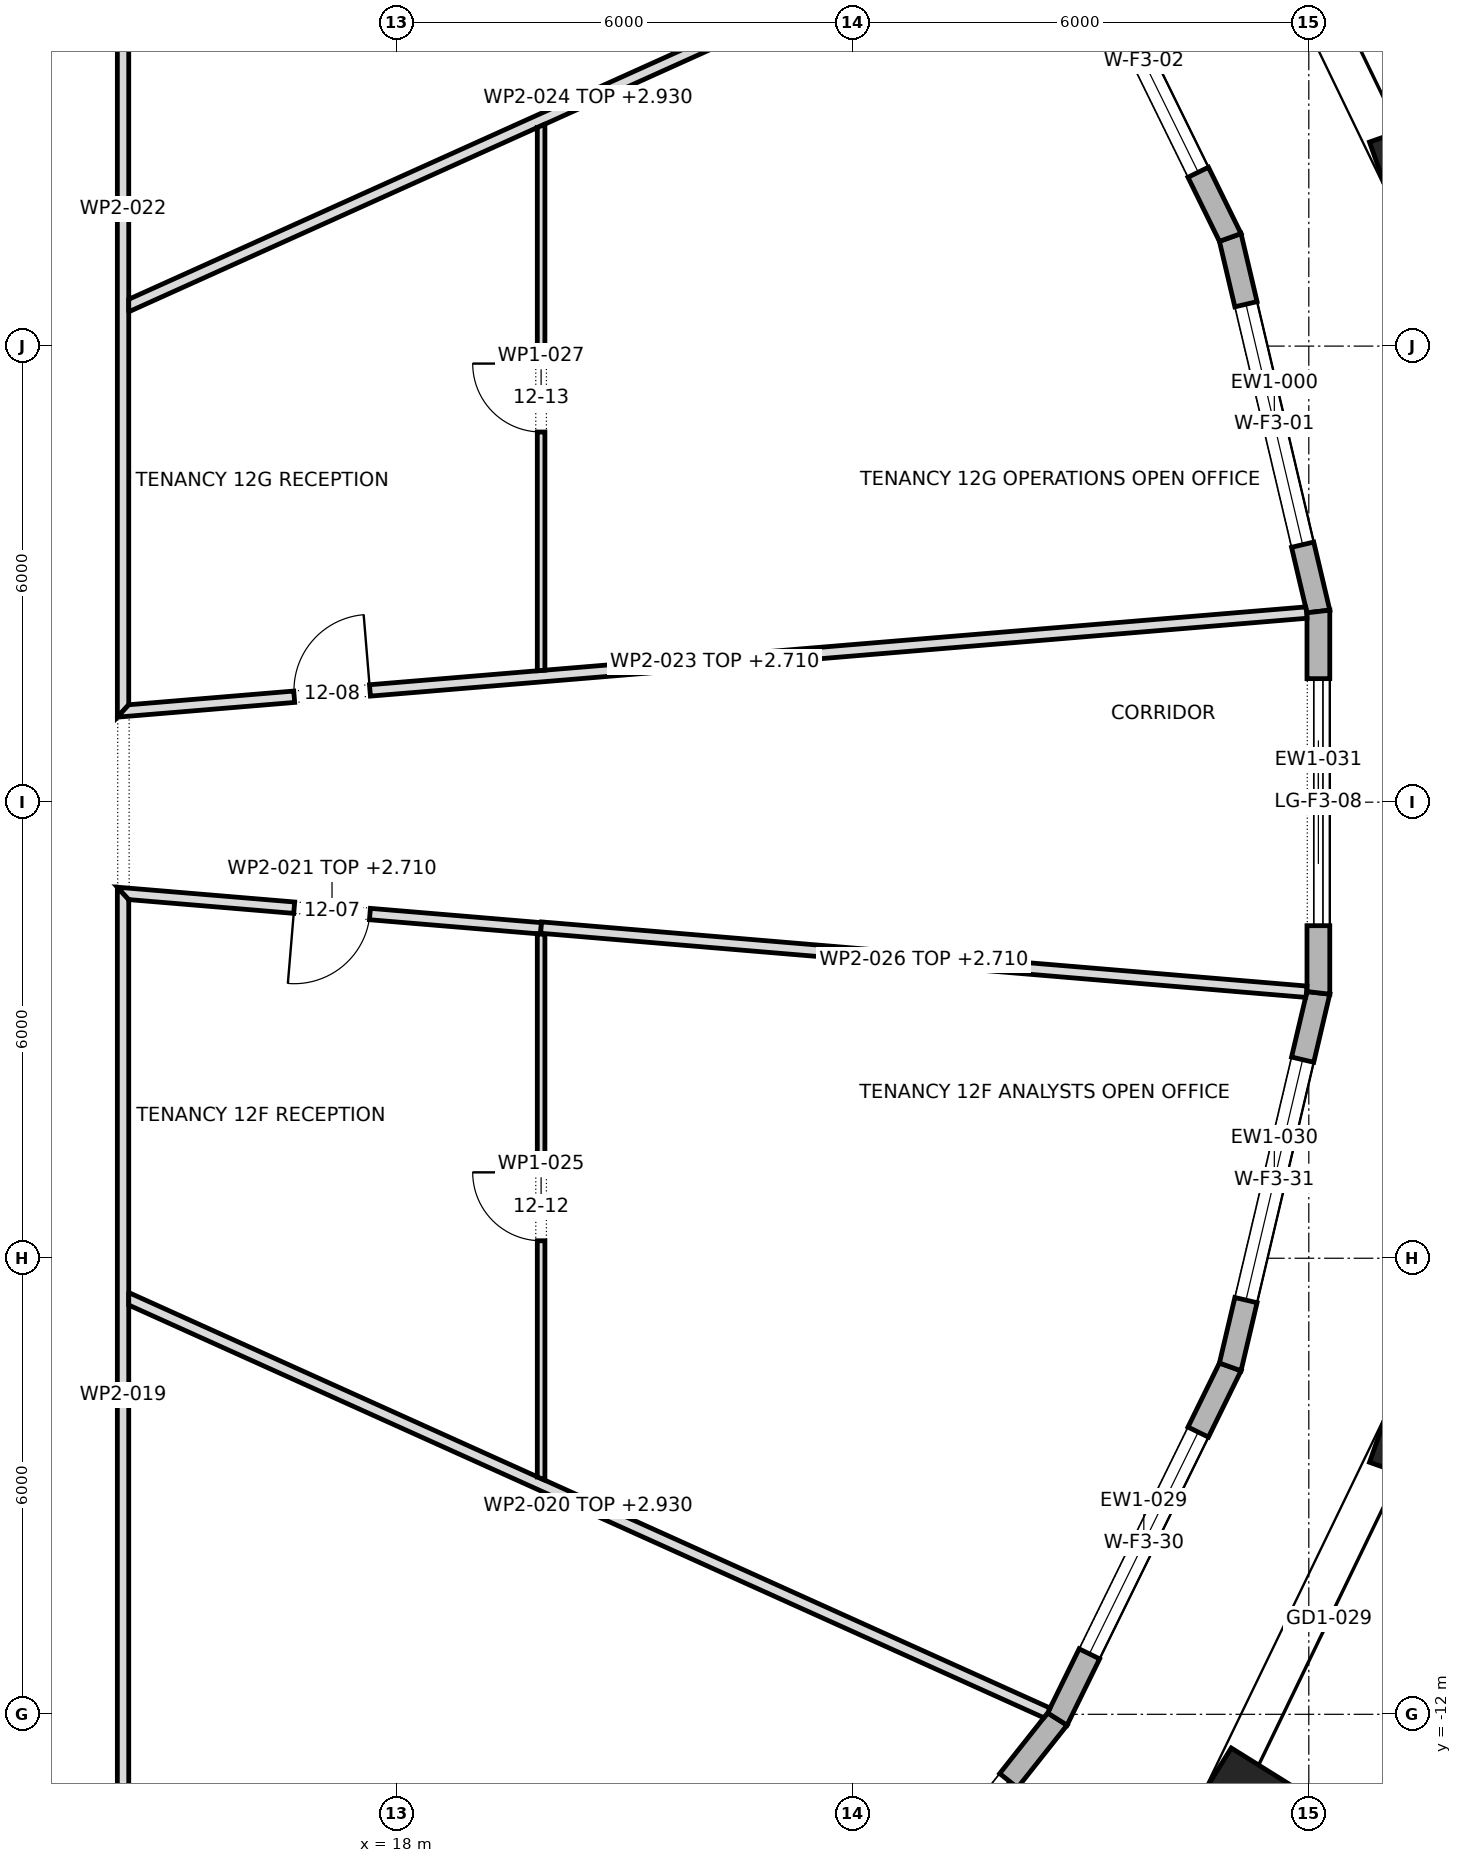
"""IFC4 building model, lengths in metres.
Left out: names, types, materials, properties, quantities, classifications, styles, units other than length and angle.
Written with IfcOpenShell. Run it as: python <this file> out.ifc"""

import sys

from ifc_helpers import new_model, si_unit, direction, frame, frame_2d, origin, origin_2d, place, context, subcontext, project, spatial, polyline, rectangle, outline, extrude, element, fill, save


model = new_model("IFC4")
c1 = context("Model", 3, precision=1e-05, world=origin(), true_north=direction((0.0, 1.0)))
c2 = subcontext(c1, "Body", "Model", "MODEL_VIEW")
j1 = project(units=[si_unit("LENGTHUNIT", "METRE"), si_unit("PLANEANGLEUNIT", "RADIAN")], contexts=[c1])
p1 = place(None, origin())
s1 = spatial("IfcSite", under=j1, at=p1, CompositionType="ELEMENT")
p2 = place(p1, origin())
s2 = spatial("IfcBuilding", under=s1, at=p2, CompositionType="ELEMENT")
p3 = place(p2, frame((0.0, 0.0, 178.9)))
s3 = spatial("IfcBuildingStorey", under=s2, at=p3, CompositionType="ELEMENT", Elevation=178.9)
for number, where, z_axis, x_axis in (
    (1, (31.503, 8.191, 0.0), (0.0, 0.0, 1.0), (-0.334, 0.943, 0.0)),
    (2, (29.034, -13.302, 0.0), (0.0, 0.0, 1.0), (0.529, 0.849, 0.0)),
    (3, (31.503, -8.191, 0.0), (0.0, 0.0, 1.0), (0.334, 0.943, 0.0)),
):
    element("IfcColumn", number, at=place(p3, frame(where, z_axis=z_axis, x_axis=x_axis)), inside=s3, PredefinedType="COLUMN", context=c2, shape_type="SweptSolid", body=[
        extrude(rectangle(XDim=1.4, YDim=1.0, at=origin_2d()), origin(), (0.0, 0.0, 1.0), 4.0),
    ])
p4 = place(p3, frame((30.126, 2.509, 0.0), z_axis=(0.0, 0.0, 1.0), x_axis=(-0.229434992017, 0.973323987395, 0.0)))
e4 = element("IfcWall", 4, at=p4, inside=s3, PredefinedType="STANDARD", context=c2, shape_type="SweptSolid", body=[
    extrude(outline(polyline([(-0.017, -0.15), (5.072, -0.15), (5.039, 0.15), (0.017, 0.15), (-0.017, -0.15)])), origin(), (0.0, 0.0, 1.0), 3.7),
])
p5 = place(p4, frame((0.903, 0.0, 0.6)))
e5 = element("IfcOpeningElement", 5, at=p5, cuts=e4, PredefinedType="OPENING", context=c2, shape_type="SweptSolid", body=[
    extrude(rectangle(XDim=3.25, YDim=2.65, at=frame_2d((1.625, 1.325))), frame((0.0, 0.162, 0.0), z_axis=(0.0, -1.0, 0.0), x_axis=(1.0, 0.0, 0.0)), (0.0, 0.0, 1.0), 0.324),
])
p6 = place(p3, frame((28.966, 7.429, 0.0), z_axis=(0.0, 0.0, 1.0), x_axis=(-0.440673883676, 0.897667270343, 0.0)))
e6 = element("IfcWall", 6, at=p6, inside=s3, PredefinedType="STANDARD", context=c2, shape_type="SweptSolid", body=[
    extrude(outline(polyline([(-0.017, -0.15), (5.177, -0.15), (5.145, 0.15), (0.017, 0.15), (-0.017, -0.15)])), origin(), (0.0, 0.0, 1.0), 3.7),
])
p7 = place(p6, frame((0.956, 0.0, 0.6)))
e7 = element("IfcOpeningElement", 7, at=p7, cuts=e6, PredefinedType="OPENING", context=c2, shape_type="SweptSolid", body=[
    extrude(rectangle(XDim=3.25, YDim=2.65, at=frame_2d((1.625, 1.325))), frame((0.0, 0.162, 0.0), z_axis=(0.0, -1.0, 0.0), x_axis=(1.0, 0.0, 0.0)), (0.0, 0.0, 1.0), 0.324),
])
p8 = place(p3, frame((23.392, -16.23, 0.0), z_axis=(0.0, 0.0, 1.0), x_axis=(0.620766467446, 0.78399553117, 0.0)))
e8 = element("IfcWall", 8, at=p8, inside=s3, PredefinedType="STANDARD", context=c2, shape_type="SweptSolid", body=[
    extrude(outline(polyline([(-0.015, -0.15), (5.332, -0.15), (5.3, 0.15), (0.015, 0.15), (-0.015, -0.15)])), origin(), (0.0, 0.0, 1.0), 3.7),
])
p9 = place(p8, frame((1.033, 0.0, 0.6)))
e9 = element("IfcOpeningElement", 9, at=p9, cuts=e8, PredefinedType="OPENING", context=c2, shape_type="SweptSolid", body=[
    extrude(rectangle(XDim=3.25, YDim=2.65, at=frame_2d((1.625, 1.325))), frame((0.0, 0.162, 0.0), z_axis=(0.0, -1.0, 0.0), x_axis=(1.0, 0.0, 0.0)), (0.0, 0.0, 1.0), 0.324),
])
p10 = place(p3, frame((26.692, -12.062, 0.0), z_axis=(0.0, 0.0, 1.0), x_axis=(0.440673883676, 0.897667270343, 0.0)))
e10 = element("IfcWall", 10, at=p10, inside=s3, PredefinedType="STANDARD", context=c2, shape_type="SweptSolid", body=[
    extrude(outline(polyline([(-0.016, -0.15), (5.178, -0.15), (5.144, 0.15), (0.016, 0.15), (-0.016, -0.15)])), origin(), (0.0, 0.0, 1.0), 3.7),
])
p11 = place(p10, frame((0.956, 0.0, 0.6)))
e11 = element("IfcOpeningElement", 11, at=p11, cuts=e10, PredefinedType="OPENING", context=c2, shape_type="SweptSolid", body=[
    extrude(rectangle(XDim=3.25, YDim=2.65, at=frame_2d((1.625, 1.325))), frame((0.0, 0.162, 0.0), z_axis=(0.0, -1.0, 0.0), x_axis=(1.0, 0.0, 0.0)), (0.0, 0.0, 1.0), 0.324),
])
p12 = place(p3, frame((28.966, -7.429, 0.0), z_axis=(0.0, 0.0, 1.0), x_axis=(0.229434992017, 0.973323987395, 0.0)))
e12 = element("IfcWall", 12, at=p12, inside=s3, PredefinedType="STANDARD", context=c2, shape_type="SweptSolid", body=[
    extrude(outline(polyline([(-0.017, -0.15), (5.073, -0.15), (5.038, 0.15), (0.017, 0.15), (-0.017, -0.15)])), origin(), (0.0, 0.0, 1.0), 3.7),
])
p13 = place(p12, frame((0.903, 0.0, 0.6)))
e13 = element("IfcOpeningElement", 13, at=p13, cuts=e12, PredefinedType="OPENING", context=c2, shape_type="SweptSolid", body=[
    extrude(rectangle(XDim=3.25, YDim=2.65, at=frame_2d((1.625, 1.325))), frame((0.0, 0.162, 0.0), z_axis=(0.0, -1.0, 0.0), x_axis=(1.0, 0.0, 0.0)), (0.0, 0.0, 1.0), 0.324),
])
p14 = place(p3, frame((30.126, -2.509, 0.0), z_axis=(0.0, 0.0, 1.0), x_axis=(0.0, 1.0, 0.0)))
e14 = element("IfcWall", 14, at=p14, inside=s3, PredefinedType="STANDARD", context=c2, shape_type="SweptSolid", body=[
    extrude(outline(polyline([(-0.017, -0.15), (5.035, -0.15), (5.0, 0.15), (0.017, 0.15), (-0.017, -0.15)])), origin(), (0.0, 0.0, 1.0), 3.7),
])
p15 = place(p14, frame((0.884, 0.0, 0.0)))
e15 = element("IfcOpeningElement", 15, at=p15, cuts=e14, PredefinedType="OPENING", context=c2, shape_type="SweptSolid", body=[
    extrude(rectangle(XDim=3.25, YDim=3.25, at=frame_2d((1.625, 1.625))), frame((0.0, 0.162, 0.0), z_axis=(0.0, -1.0, 0.0), x_axis=(1.0, 0.0, 0.0)), (0.0, 0.0, 1.0), 0.324),
])
p16 = place(p3, frame((14.4, -14.475, 0.0), z_axis=(0.0, 0.0, 1.0), x_axis=(0.0, 1.0, 0.0)))
e16 = element("IfcWall", 16, at=p16, inside=s3, PredefinedType="PARTITIONING", context=c2, shape_type="SweptSolid", body=[
    extrude(outline(polyline([(0.0, -0.075), (1.885, -0.075), (3.77, -0.075), (5.655, -0.075), (7.539, -0.075), (9.424, -0.075), (11.309, -0.075), (13.194, -0.075), (13.357, 0.075), (11.47, 0.075), (9.583, 0.075), (7.697, 0.075), (5.81, 0.075), (3.923, 0.075), (2.037, 0.075), (0.15, 0.075), (0.0, -0.075)])), origin(), (0.0, 0.0, 1.0), 3.7),
])
p17 = place(p3, frame((14.444, -6.52, 0.0), z_axis=(0.0, 0.0, 1.0), x_axis=(0.911592423636, -0.411095187479, 0.0)))
e17 = element("IfcWall", 17, at=p17, inside=s3, PredefinedType="PARTITIONING", context=c2, shape_type="SweptSolid", body=[
    extrude(outline(polyline([(0.068, -0.075), (1.954, -0.075), (3.841, -0.075), (5.728, -0.075), (7.615, -0.075), (9.501, -0.075), (11.388, -0.075), (13.274, -0.075), (13.294, 0.003), (13.296, 0.072), (13.296, 0.075), (11.448, 0.075), (9.599, 0.075), (7.75, 0.075), (5.901, 0.075), (5.897, 0.073), (5.896, 0.075), (3.931, 0.075), (1.966, 0.075), (0.0, 0.075), (0.068, -0.075)])), origin(), (0.0, 0.0, 1.0), 2.93),
])
p18 = place(p3, frame((14.319, -1.193, 0.0), z_axis=(0.0, 0.0, 1.0), x_axis=(0.996519550004, -0.083359381354, 0.0)))
e18 = element("IfcWall", 18, at=p18, inside=s3, PredefinedType="PARTITIONING", context=c2, shape_type="SweptSolid", body=[
    extrude(outline(polyline([(0.163, -0.075), (1.973, -0.075), (3.783, -0.075), (5.593, -0.075), (5.6, -0.074), (5.6, 0.075), (3.733, 0.075), (1.867, 0.075), (0.0, 0.075), (0.082, 0.0), (0.163, -0.075)])), origin(), (0.0, 0.0, 1.0), 2.71),
])
p19 = place(p18, frame((2.341, 0.0, 0.0)))
e19 = element("IfcOpeningElement", 19, at=p19, cuts=e18, PredefinedType="OPENING", context=c2, shape_type="SweptSolid", body=[
    extrude(rectangle(XDim=1.0, YDim=2.1, at=frame_2d((0.5, 1.05))), frame((0.0, 0.087, 0.0), z_axis=(0.0, -1.0, 0.0), x_axis=(1.0, 0.0, 0.0)), (0.0, 0.0, 1.0), 0.174),
])
p20 = place(p3, frame((14.4, 1.118, 0.0), z_axis=(0.0, 0.0, 1.0), x_axis=(0.0, 1.0, 0.0)))
e20 = element("IfcWall", 20, at=p20, inside=s3, PredefinedType="PARTITIONING", context=c2, shape_type="SweptSolid", body=[
    extrude(outline(polyline([(0.163, -0.075), (2.048, -0.075), (3.933, -0.075), (5.817, -0.075), (7.702, -0.075), (9.587, -0.075), (11.472, -0.075), (13.356, -0.075), (13.207, 0.075), (11.32, 0.075), (9.433, 0.075), (7.547, 0.075), (5.66, 0.075), (3.773, 0.075), (1.887, 0.075), (0.0, 0.075), (0.163, -0.075)])), origin(), (0.0, 0.0, 1.0), 3.7),
])
p21 = place(p20, frame((8.832, 0.0, 0.0)))
e21 = element("IfcOpeningElement", 21, at=p21, cuts=e20, PredefinedType="OPENING", context=c2, shape_type="SweptSolid", body=[
    extrude(rectangle(XDim=1.0, YDim=2.1, at=frame_2d((0.5, 1.05))), frame((0.0, 0.087, 0.0), z_axis=(0.0, -1.0, 0.0), x_axis=(1.0, 0.0, 0.0)), (0.0, 0.0, 1.0), 0.174),
])
p22 = place(p3, frame((14.319, 1.193, 0.0), z_axis=(0.0, 0.0, 1.0), x_axis=(0.996561500002, 0.082856361942, 0.0)))
e22 = element("IfcWall", 22, at=p22, inside=s3, PredefinedType="PARTITIONING", context=c2, shape_type="SweptSolid", body=[
    extrude(outline(polyline([(0.0, -0.075), (1.963, -0.075), (3.926, -0.075), (5.889, -0.075), (7.853, -0.075), (9.816, -0.075), (11.779, -0.075), (13.742, -0.075), (15.705, -0.075), (15.705, -0.074), (15.705, 0.036), (15.699, 0.075), (13.757, 0.075), (11.815, 0.075), (9.873, 0.075), (7.931, 0.075), (5.989, 0.075), (4.047, 0.075), (2.105, 0.075), (0.163, 0.075), (0.082, 0.0), (0.0, -0.075), (0.0, -0.075)])), origin(), (0.0, 0.0, 1.0), 2.71),
])
p23 = place(p22, frame((2.341, 0.0, 0.0)))
e23 = element("IfcOpeningElement", 23, at=p23, cuts=e22, PredefinedType="OPENING", context=c2, shape_type="SweptSolid", body=[
    extrude(rectangle(XDim=1.0, YDim=2.1, at=frame_2d((0.5, 1.05))), frame((0.0, 0.087, 0.0), z_axis=(0.0, -1.0, 0.0), x_axis=(1.0, 0.0, 0.0)), (0.0, 0.0, 1.0), 0.174),
])
p24 = place(p3, frame((14.445, 6.52, 0.0), z_axis=(0.0, 0.0, 1.0), x_axis=(0.911609963385, 0.411056291349, 0.0)))
e24 = element("IfcWall", 24, at=p24, inside=s3, PredefinedType="PARTITIONING", context=c2, shape_type="SweptSolid", body=[
    extrude(outline(polyline([(0.0, -0.075), (1.965, -0.075), (3.93, -0.075), (5.896, -0.075), (5.897, -0.073), (5.901, -0.075), (7.75, -0.075), (9.599, -0.075), (11.447, -0.075), (13.296, -0.075), (13.296, -0.069), (13.294, -0.003), (13.274, 0.075), (11.387, 0.075), (9.501, 0.075), (7.614, 0.075), (5.727, 0.075), (3.841, 0.075), (1.954, 0.075), (0.067, 0.075), (0.0, -0.074), (0.0, -0.075)])), origin(), (0.0, 0.0, 1.0), 2.93),
])
p25 = place(p3, frame((19.9, -1.729, 0.0), z_axis=(0.0, 0.0, 1.0), x_axis=(0.0, -1.0, 0.0)))
e25 = element("IfcWall", 25, at=p25, inside=s3, PredefinedType="PARTITIONING", context=c2, shape_type="SweptSolid", body=[
    extrude(outline(polyline([(0.002, -0.05), (1.788, -0.05), (3.574, -0.05), (5.36, -0.05), (7.146, -0.05), (7.191, 0.05), (7.191, 0.05), (5.393, 0.05), (3.595, 0.05), (1.798, 0.05), (0.0, 0.05), (0.0, -0.007), (0.005, -0.007), (0.002, -0.05)])), origin(), (0.0, 0.0, 1.0), 3.7),
])
p26 = place(p25, frame((3.14, 0.0, 0.0)))
e26 = element("IfcOpeningElement", 26, at=p26, cuts=e25, PredefinedType="OPENING", context=c2, shape_type="SweptSolid", body=[
    extrude(rectangle(XDim=0.9, YDim=2.1, at=frame_2d((0.45, 1.05))), frame((0.0, 0.062, 0.0), z_axis=(0.0, -1.0, 0.0), x_axis=(1.0, 0.0, 0.0)), (0.0, 0.0, 1.0), 0.124),
])
p27 = place(p3, frame((19.9, -1.65, 0.0), z_axis=(0.0, 0.0, 1.0), x_axis=(0.996505820255, -0.083523351209, 0.0)))
e27 = element("IfcWall", 27, at=p27, inside=s3, PredefinedType="PARTITIONING", context=c2, shape_type="SweptSolid", body=[
    extrude(outline(polyline([(0.0, -0.075), (1.683, -0.075), (3.366, -0.075), (5.05, -0.075), (6.733, -0.075), (8.417, -0.075), (10.1, -0.075), (10.105, -0.039), (10.105, 0.075), (8.421, 0.075), (6.737, 0.075), (5.052, 0.075), (3.368, 0.075), (1.684, 0.075), (0.0, 0.075), (0.0, -0.075)])), origin(), (0.0, 0.0, 1.0), 2.71),
])
p28 = place(p3, frame((19.9, 8.92, 0.0), z_axis=(0.0, 0.0, 1.0), x_axis=(0.0, -1.0, 0.0)))
e28 = element("IfcWall", 28, at=p28, inside=s3, PredefinedType="PARTITIONING", context=c2, shape_type="SweptSolid", body=[
    extrude(outline(polyline([(7.191, -0.05), (7.191, -0.048), (7.183, 0.05), (5.387, 0.05), (3.592, 0.05), (1.796, 0.05), (0.0, 0.05), (0.0, 0.049), (0.045, -0.05), (1.832, -0.05), (3.618, -0.05), (5.405, -0.05), (7.191, -0.05)])), origin(), (0.0, 0.0, 1.0), 3.7),
])
p29 = place(p28, frame((3.15, 0.0, 0.0)))
e29 = element("IfcOpeningElement", 29, at=p29, cuts=e28, PredefinedType="OPENING", context=c2, shape_type="SweptSolid", body=[
    extrude(rectangle(XDim=0.9, YDim=2.1, at=frame_2d((0.45, 1.05))), frame((0.0, 0.062, 0.0), z_axis=(0.0, -1.0, 0.0), x_axis=(1.0, 0.0, 0.0)), (0.0, 0.0, 1.0), 0.124),
])
p30 = place(p5, origin())
e30 = element("IfcWindow", 30, at=p30, inside=s3, PartitioningType="TRIPLE_PANEL_VERTICAL", PredefinedType="WINDOW", context=c2, shape_type="SweptSolid", body=[
    extrude(rectangle(XDim=3.25, YDim=2.65, at=frame_2d((1.625, 1.325))), frame((0.0, 0.03, 0.0), z_axis=(0.0, -1.0, 0.0), x_axis=(1.0, 0.0, 0.0)), (0.0, 0.0, 1.0), 0.06),
])
fill(e5, e30)
p31 = place(p7, origin())
e31 = element("IfcWindow", 31, at=p31, inside=s3, PartitioningType="TRIPLE_PANEL_VERTICAL", PredefinedType="WINDOW", context=c2, shape_type="SweptSolid", body=[
    extrude(rectangle(XDim=3.25, YDim=2.65, at=frame_2d((1.625, 1.325))), frame((0.0, 0.03, 0.0), z_axis=(0.0, -1.0, 0.0), x_axis=(1.0, 0.0, 0.0)), (0.0, 0.0, 1.0), 0.06),
])
fill(e7, e31)
p32 = place(p9, origin())
e32 = element("IfcWindow", 32, at=p32, inside=s3, PartitioningType="TRIPLE_PANEL_VERTICAL", PredefinedType="WINDOW", context=c2, shape_type="SweptSolid", body=[
    extrude(rectangle(XDim=3.25, YDim=2.65, at=frame_2d((1.625, 1.325))), frame((0.0, 0.03, 0.0), z_axis=(0.0, -1.0, 0.0), x_axis=(1.0, 0.0, 0.0)), (0.0, 0.0, 1.0), 0.06),
])
fill(e9, e32)
p33 = place(p11, origin())
e33 = element("IfcWindow", 33, at=p33, inside=s3, PartitioningType="TRIPLE_PANEL_VERTICAL", PredefinedType="WINDOW", context=c2, shape_type="SweptSolid", body=[
    extrude(rectangle(XDim=3.25, YDim=2.65, at=frame_2d((1.625, 1.325))), frame((0.0, 0.03, 0.0), z_axis=(0.0, -1.0, 0.0), x_axis=(1.0, 0.0, 0.0)), (0.0, 0.0, 1.0), 0.06),
])
fill(e11, e33)
p34 = place(p13, origin())
e34 = element("IfcWindow", 34, at=p34, inside=s3, PartitioningType="TRIPLE_PANEL_VERTICAL", PredefinedType="WINDOW", context=c2, shape_type="SweptSolid", body=[
    extrude(rectangle(XDim=3.25, YDim=2.65, at=frame_2d((1.625, 1.325))), frame((0.0, 0.03, 0.0), z_axis=(0.0, -1.0, 0.0), x_axis=(1.0, 0.0, 0.0)), (0.0, 0.0, 1.0), 0.06),
])
fill(e13, e34)
p35 = place(p15, origin())
e35 = element("IfcDoor", 35, at=p35, inside=s3, OperationType="DOUBLE_DOOR_SLIDING", PredefinedType="DOOR", context=c2, shape_type="SweptSolid", body=[
    extrude(rectangle(XDim=3.25, YDim=3.25, at=frame_2d((1.625, 1.625))), frame((0.0, 0.025, 0.0), z_axis=(0.0, -1.0, 0.0), x_axis=(1.0, 0.0, 0.0)), (0.0, 0.0, 1.0), 0.05),
])
fill(e15, e35)
p36 = place(p19, frame((1.0, 0.0, 0.0), z_axis=(0.0, 0.0, 1.0), x_axis=(-1.0, 0.0, 0.0)))
e36 = element("IfcDoor", 36, at=p36, inside=s3, OperationType="SINGLE_SWING_LEFT", PredefinedType="DOOR", context=c2, shape_type="SweptSolid", body=[
    extrude(rectangle(XDim=1.0, YDim=2.1, at=frame_2d((0.5, 1.05))), frame((0.0, 0.025, 0.0), z_axis=(0.0, -1.0, 0.0), x_axis=(1.0, 0.0, 0.0)), (0.0, 0.0, 1.0), 0.05),
])
fill(e19, e36)
p37 = place(p23, origin())
e37 = element("IfcDoor", 37, at=p37, inside=s3, OperationType="SINGLE_SWING_LEFT", PredefinedType="DOOR", context=c2, shape_type="SweptSolid", body=[
    extrude(rectangle(XDim=1.0, YDim=2.1, at=frame_2d((0.5, 1.05))), frame((0.0, 0.025, 0.0), z_axis=(0.0, -1.0, 0.0), x_axis=(1.0, 0.0, 0.0)), (0.0, 0.0, 1.0), 0.05),
])
fill(e23, e37)
p38 = place(p26, frame((0.9, 0.0, 0.0), z_axis=(0.0, 0.0, 1.0), x_axis=(-1.0, 0.0, 0.0)))
e38 = element("IfcDoor", 38, at=p38, inside=s3, OperationType="SINGLE_SWING_LEFT", PredefinedType="DOOR", context=c2, shape_type="SweptSolid", body=[
    extrude(rectangle(XDim=0.9, YDim=2.1, at=frame_2d((0.45, 1.05))), frame((0.0, 0.025, 0.0), z_axis=(0.0, -1.0, 0.0), x_axis=(1.0, 0.0, 0.0)), (0.0, 0.0, 1.0), 0.05),
])
fill(e26, e38)
p39 = place(p29, frame((0.9, 0.0, 0.0), z_axis=(0.0, 0.0, 1.0), x_axis=(-1.0, 0.0, 0.0)))
e39 = element("IfcDoor", 39, at=p39, inside=s3, OperationType="SINGLE_SWING_LEFT", PredefinedType="DOOR", context=c2, shape_type="SweptSolid", body=[
    extrude(rectangle(XDim=0.9, YDim=2.1, at=frame_2d((0.45, 1.05))), frame((0.0, 0.025, 0.0), z_axis=(0.0, -1.0, 0.0), x_axis=(1.0, 0.0, 0.0)), (0.0, 0.0, 1.0), 0.05),
])
fill(e29, e39)
save(model, sys.argv[1])
